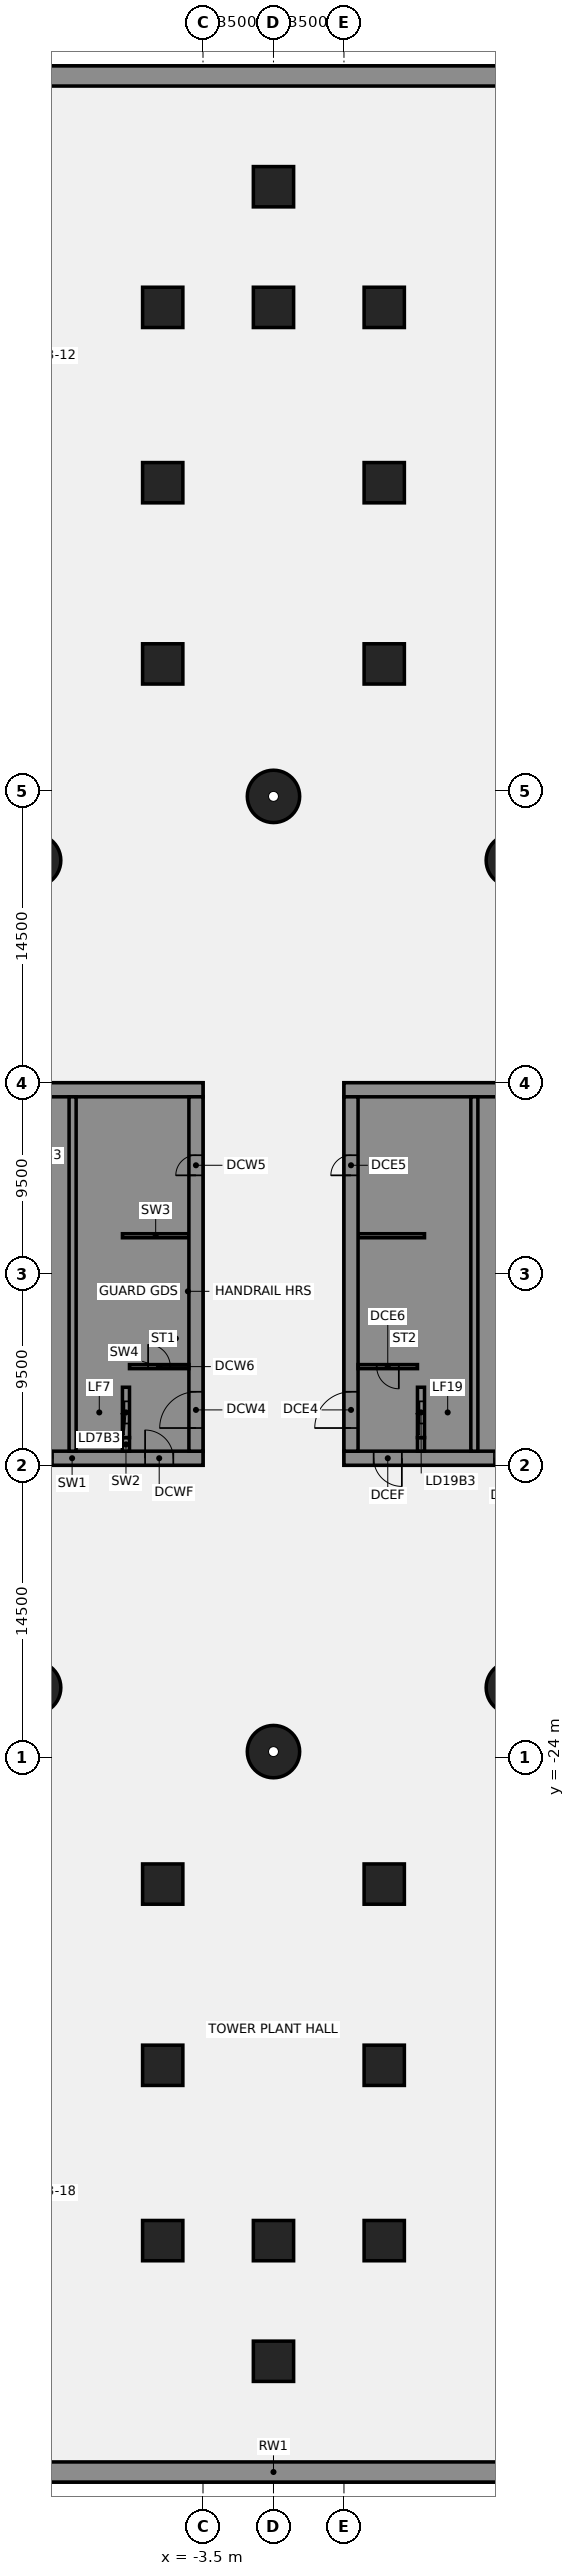
"""IFC4 building model, lengths in metres.
Left out: names, types, materials, properties, quantities, classifications, styles, units other than length and angle.
Written with IfcOpenShell. Run it as: python <this file> out.ifc"""

import sys

from ifc_helpers import new_model, si_unit, direction, frame, frame_2d, origin, origin_2d, place, context, subcontext, project, spatial, polyline, rectangle, circle, outline, extrude, element, fill, save


model = new_model("IFC4")
c1 = context("Model", 3, precision=1e-05, world=origin(), true_north=direction((0.0, 1.0)))
c2 = subcontext(c1, "Body", "Model", "MODEL_VIEW")
j1 = project(units=[si_unit("LENGTHUNIT", "METRE"), si_unit("PLANEANGLEUNIT", "RADIAN")], contexts=[c1])
p1 = place(None, origin())
s1 = spatial("IfcSite", under=j1, at=p1, CompositionType="ELEMENT")
p2 = place(p1, origin())
s2 = spatial("IfcBuilding", under=s1, at=p2, CompositionType="ELEMENT")
p3 = place(p2, frame((0.0, 0.0, -21.0)))
s3 = spatial("IfcBuildingStorey", under=s2, at=p3, CompositionType="ELEMENT", Elevation=-21.0)
for number, where, z_axis, x_axis in (
    (1, (63.931, -59.5, -0.3), (0.0, 0.0, 1.0), (-1.0, 0.0, 0.0)),
    (2, (-63.931, 59.5, -0.3), (0.0, 0.0, 1.0), (1.0, 0.0, 0.0)),
):
    element("IfcWall", number, at=place(p3, frame(where, z_axis=z_axis, x_axis=x_axis)), inside=s3, PredefinedType="SOLIDWALL", context=c2, shape_type="SweptSolid", body=[
        extrude(rectangle(XDim=127.863, YDim=1.0, at=frame_2d((63.931, 0.0))), origin(), (0.0, 0.0, 1.0), 6.85),
    ])
for number, where, z_axis, x_axis in (
    (3, (11.86, 20.543, -0.3), (0.0, 0.0, 1.0), (1.0, 0.0, 0.0)),
    (4, (0.0, 23.721, -0.3), (0.0, 0.0, 1.0), (1.0, 0.0, 0.0)),
    (5, (-11.86, 20.543, -0.3), (0.0, 0.0, 1.0), (1.0, 0.0, 0.0)),
    (6, (-11.86, -20.543, -0.3), (0.0, 0.0, 1.0), (1.0, 0.0, 0.0)),
    (7, (0.0, -23.721, -0.3), (0.0, 0.0, 1.0), (1.0, 0.0, 0.0)),
    (8, (11.86, -20.543, -0.3), (0.0, 0.0, 1.0), (1.0, 0.0, 0.0)),
):
    element("IfcColumn", number, at=place(p3, frame(where, z_axis=z_axis, x_axis=x_axis)), inside=s3, PredefinedType="COLUMN", context=c2, shape_type="SweptSolid", body=[
        extrude(circle(Radius=1.3, at=origin_2d()), origin(), (0.0, 0.0, 1.0), 6.85),
    ])
for number, where, z_axis, x_axis in (
    (9, (-5.5, 39.3, -0.3), (0.0, 0.0, 1.0), (1.0, 0.0, 0.0)),
    (10, (5.5, 39.3, -0.3), (0.0, 0.0, 1.0), (1.0, 0.0, 0.0)),
    (11, (-5.5, 30.3, -0.3), (0.0, 0.0, 1.0), (1.0, 0.0, 0.0)),
    (12, (5.5, 30.3, -0.3), (0.0, 0.0, 1.0), (1.0, 0.0, 0.0)),
    (13, (5.5, 48.008, -0.3), (0.0, 0.0, 1.0), (1.0, 0.0, 0.0)),
    (14, (0.0, 48.008, -0.3), (0.0, 0.0, 1.0), (1.0, 0.0, 0.0)),
    (15, (-5.5, 48.008, -0.3), (0.0, 0.0, 1.0), (1.0, 0.0, 0.0)),
    (16, (5.5, -39.3, -0.3), (0.0, 0.0, 1.0), (1.0, 0.0, 0.0)),
    (17, (-5.5, -39.3, -0.3), (0.0, 0.0, 1.0), (1.0, 0.0, 0.0)),
    (18, (5.5, -30.3, -0.3), (0.0, 0.0, 1.0), (1.0, 0.0, 0.0)),
    (19, (-5.5, -30.3, -0.3), (0.0, 0.0, 1.0), (1.0, 0.0, 0.0)),
    (20, (-5.5, -48.008, -0.3), (0.0, 0.0, 1.0), (1.0, 0.0, 0.0)),
    (21, (0.0, -48.008, -0.3), (0.0, 0.0, 1.0), (1.0, 0.0, 0.0)),
    (22, (5.5, -48.008, -0.3), (0.0, 0.0, 1.0), (1.0, 0.0, 0.0)),
    (23, (0.0, -54.0, -0.3), (0.0, 0.0, 1.0), (1.0, 0.0, 0.0)),
    (24, (0.0, 54.0, -0.3), (0.0, 0.0, 1.0), (1.0, 0.0, 0.0)),
):
    element("IfcColumn", number, at=place(p3, frame(where, z_axis=z_axis, x_axis=x_axis)), inside=s3, PredefinedType="COLUMN", context=c2, shape_type="SweptSolid", body=[
        extrude(rectangle(XDim=2.0, YDim=2.0, at=origin_2d()), origin(), (0.0, 0.0, 1.0), 6.85),
    ])
p4 = place(p3, frame((-16.5, -9.15, 0.0), z_axis=(0.0, 0.0, 1.0), x_axis=(1.0, 0.0, 0.0)))
e25 = element("IfcWall", 25, at=p4, inside=s3, PredefinedType="SHEAR", context=c2, shape_type="SweptSolid", body=[
    extrude(rectangle(XDim=13.0, YDim=0.7, at=frame_2d((6.5, 0.0))), origin(), (0.0, 0.0, 1.0), 6.55),
])
p5 = place(p4, frame((4.15, 0.0, 0.0)))
e26 = element("IfcOpeningElement", 26, at=p5, cuts=e25, PredefinedType="OPENING", context=c2, shape_type="SweptSolid", body=[
    extrude(rectangle(XDim=1.4, YDim=2.1, at=frame_2d((0.7, 1.05))), frame((0.0, 0.36, 0.0), z_axis=(0.0, -1.0, 0.0), x_axis=(1.0, 0.0, 0.0)), (0.0, 0.0, 1.0), 0.72),
])
p6 = place(p4, frame((10.125, 0.0, 0.0)))
e27 = element("IfcOpeningElement", 27, at=p6, cuts=e25, PredefinedType="OPENING", context=c2, shape_type="SweptSolid", body=[
    extrude(rectangle(XDim=1.4, YDim=2.1, at=frame_2d((0.7, 1.05))), frame((0.0, 0.36, 0.0), z_axis=(0.0, -1.0, 0.0), x_axis=(1.0, 0.0, 0.0)), (0.0, 0.0, 1.0), 0.72),
])
p7 = place(p3, frame((-16.5, 9.15, 0.0), z_axis=(0.0, 0.0, 1.0), x_axis=(1.0, 0.0, 0.0)))
e28 = element("IfcWall", 28, at=p7, inside=s3, PredefinedType="SHEAR", context=c2, shape_type="SweptSolid", body=[
    extrude(rectangle(XDim=13.0, YDim=0.7, at=frame_2d((6.5, 0.0))), origin(), (0.0, 0.0, 1.0), 6.55),
])
p8 = place(p3, origin())
e29 = element("IfcWall", 29, at=p8, inside=s3, PredefinedType="SHEAR", context=c2, shape_type="SweptSolid", body=[
    extrude(outline(polyline([(-9.8, -5.375), (-9.8, -5.625), (-7.5, -5.625), (-7.15, -5.625), (-7.15, 8.8), (-7.5, 8.8), (-9.8, 8.8), (-9.8, 8.125), (-7.5, 8.125), (-7.5, 5.625), (-9.8, 5.625), (-9.8, 5.375), (-7.5, 5.375), (-7.5, 2.875), (-9.8, 2.875), (-9.8, 2.625), (-7.5, 2.625), (-7.5, 0.125), (-9.8, 0.125), (-9.8, -0.125), (-7.5, -0.125), (-7.5, -2.625), (-9.8, -2.625), (-9.8, -2.875), (-7.5, -2.875), (-7.5, -5.375), (-9.8, -5.375)])), origin(), (0.0, 0.0, 1.0), 6.55),
])
p9 = place(p3, origin())
e30 = element("IfcWall", 30, at=p9, inside=s3, PredefinedType="SHEAR", context=c2, shape_type="SweptSolid", body=[
    extrude(outline(polyline([(-7.5, -8.125), (-9.55, -8.125), (-9.55, -5.625), (-9.8, -5.625), (-9.8, -8.125), (-9.8, -8.8), (-7.5, -8.8), (-7.5, -8.125)])), origin(), (0.0, 0.0, 1.0), 6.55),
])
p10 = place(p3, frame((-7.325, -8.8, 0.0), z_axis=(0.0, 0.0, 1.0), x_axis=(0.0, 1.0, 0.0)))
e31 = element("IfcWall", 31, at=p10, inside=s3, PredefinedType="SHEAR", context=c2, shape_type="SweptSolid", body=[
    extrude(rectangle(XDim=0.675, YDim=0.35, at=frame_2d((0.337, 0.0))), origin(), (0.0, 0.0, 1.0), 6.55),
])
p11 = place(p3, frame((-7.5, 1.9, 0.0), z_axis=(0.0, 0.0, 1.0), x_axis=(1.0, 0.0, 0.0)))
e32 = element("IfcWall", 32, at=p11, inside=s3, PredefinedType="SHEAR", context=c2, shape_type="SweptSolid", body=[
    extrude(rectangle(XDim=3.3, YDim=0.2, at=frame_2d((1.65, 0.0))), origin(), (0.0, 0.0, 1.0), 6.55),
])
p12 = place(p3, frame((-9.975, -8.8, 0.0), z_axis=(0.0, 0.0, 1.0), x_axis=(0.0, 1.0, 0.0)))
e33 = element("IfcWall", 33, at=p12, inside=s3, PredefinedType="SHEAR", context=c2, shape_type="SweptSolid", body=[
    extrude(rectangle(XDim=17.6, YDim=0.35, at=frame_2d((8.8, 0.0))), origin(), (0.0, 0.0, 1.0), 6.55),
])
p13 = place(p3, frame((-7.325, -8.125, 0.0), z_axis=(0.0, 0.0, 1.0), x_axis=(0.0, 1.0, 0.0)))
e34 = element("IfcWall", 34, at=p13, inside=s3, PredefinedType="SHEAR", context=c2, shape_type="SweptSolid", body=[
    extrude(rectangle(XDim=2.5, YDim=0.35, at=frame_2d((1.25, 0.0))), origin(), (0.0, 0.0, 1.0), 6.55),
])
p14 = place(p13, frame((0.7, 0.0, 0.0)))
e35 = element("IfcOpeningElement", 35, at=p14, cuts=e34, PredefinedType="OPENING", context=c2, shape_type="SweptSolid", body=[
    extrude(rectangle(XDim=1.1, YDim=2.1, at=frame_2d((0.55, 1.05))), frame((0.0, 0.185, 0.0), z_axis=(0.0, -1.0, 0.0), x_axis=(1.0, 0.0, 0.0)), (0.0, 0.0, 1.0), 0.37),
])
p15 = place(p3, frame((-3.85, -8.8, 0.0), z_axis=(0.0, 0.0, 1.0), x_axis=(0.0, 1.0, 0.0)))
e36 = element("IfcWall", 36, at=p15, inside=s3, PredefinedType="SHEAR", context=c2, shape_type="SweptSolid", body=[
    extrude(rectangle(XDim=17.6, YDim=0.7, at=frame_2d((8.8, 0.0))), origin(), (0.0, 0.0, 1.0), 6.55),
])
p16 = place(p15, frame((1.15, 0.0, 0.0)))
e37 = element("IfcOpeningElement", 37, at=p16, cuts=e36, PredefinedType="OPENING", context=c2, shape_type="SweptSolid", body=[
    extrude(rectangle(XDim=1.8, YDim=2.1, at=frame_2d((0.9, 1.05))), frame((0.0, 0.36, 0.0), z_axis=(0.0, -1.0, 0.0), x_axis=(1.0, 0.0, 0.0)), (0.0, 0.0, 1.0), 0.72),
])
p17 = place(p15, frame((13.7, 0.0, 0.0)))
e38 = element("IfcOpeningElement", 38, at=p17, cuts=e36, PredefinedType="OPENING", context=c2, shape_type="SweptSolid", body=[
    extrude(rectangle(XDim=1.0, YDim=2.1, at=frame_2d((0.5, 1.05))), frame((0.0, 0.36, 0.0), z_axis=(0.0, -1.0, 0.0), x_axis=(1.0, 0.0, 0.0)), (0.0, 0.0, 1.0), 0.72),
])
p18 = place(p3, frame((-7.15, -4.6, 0.0), z_axis=(0.0, 0.0, 1.0), x_axis=(1.0, 0.0, 0.0)))
e39 = element("IfcWall", 39, at=p18, inside=s3, PredefinedType="SHEAR", context=c2, shape_type="SweptSolid", body=[
    extrude(rectangle(XDim=2.95, YDim=0.2, at=frame_2d((1.475, 0.0))), origin(), (0.0, 0.0, 1.0), 6.55),
])
p19 = place(p18, frame((0.925, 0.0, 0.0)))
e40 = element("IfcOpeningElement", 40, at=p19, cuts=e39, PredefinedType="OPENING", context=c2, shape_type="SweptSolid", body=[
    extrude(rectangle(XDim=1.1, YDim=2.1, at=frame_2d((0.55, 1.05))), frame((0.0, 0.11, 0.0), z_axis=(0.0, -1.0, 0.0), x_axis=(1.0, 0.0, 0.0)), (0.0, 0.0, 1.0), 0.22),
])
p20 = place(p3, frame((16.5, -9.15, 0.0), z_axis=(0.0, 0.0, 1.0), x_axis=(-1.0, 0.0, 0.0)))
e41 = element("IfcWall", 41, at=p20, inside=s3, PredefinedType="SHEAR", context=c2, shape_type="SweptSolid", body=[
    extrude(rectangle(XDim=13.0, YDim=0.7, at=frame_2d((6.5, 0.0))), origin(), (0.0, 0.0, 1.0), 6.55),
])
p21 = place(p20, frame((4.15, 0.0, 0.0)))
e42 = element("IfcOpeningElement", 42, at=p21, cuts=e41, PredefinedType="OPENING", context=c2, shape_type="SweptSolid", body=[
    extrude(rectangle(XDim=1.4, YDim=2.1, at=frame_2d((0.7, 1.05))), frame((0.0, 0.36, 0.0), z_axis=(0.0, -1.0, 0.0), x_axis=(1.0, 0.0, 0.0)), (0.0, 0.0, 1.0), 0.72),
])
p22 = place(p20, frame((10.125, 0.0, 0.0)))
e43 = element("IfcOpeningElement", 43, at=p22, cuts=e41, PredefinedType="OPENING", context=c2, shape_type="SweptSolid", body=[
    extrude(rectangle(XDim=1.4, YDim=2.1, at=frame_2d((0.7, 1.05))), frame((0.0, 0.36, 0.0), z_axis=(0.0, -1.0, 0.0), x_axis=(1.0, 0.0, 0.0)), (0.0, 0.0, 1.0), 0.72),
])
p23 = place(p3, frame((16.5, 9.15, 0.0), z_axis=(0.0, 0.0, 1.0), x_axis=(-1.0, 0.0, 0.0)))
e44 = element("IfcWall", 44, at=p23, inside=s3, PredefinedType="SHEAR", context=c2, shape_type="SweptSolid", body=[
    extrude(rectangle(XDim=13.0, YDim=0.7, at=frame_2d((6.5, 0.0))), origin(), (0.0, 0.0, 1.0), 6.55),
])
p24 = place(p3, origin())
e45 = element("IfcWall", 45, at=p24, inside=s3, PredefinedType="SHEAR", context=c2, shape_type="SweptSolid", body=[
    extrude(outline(polyline([(9.8, -5.375), (7.5, -5.375), (7.5, -2.875), (9.8, -2.875), (9.8, -2.625), (7.5, -2.625), (7.5, -0.125), (9.8, -0.125), (9.8, 0.125), (7.5, 0.125), (7.5, 2.625), (9.8, 2.625), (9.8, 2.875), (7.5, 2.875), (7.5, 5.375), (9.8, 5.375), (9.8, 5.625), (7.5, 5.625), (7.5, 8.125), (9.8, 8.125), (9.8, 8.8), (7.5, 8.8), (7.15, 8.8), (7.15, -5.625), (7.5, -5.625), (9.8, -5.625), (9.8, -5.375)])), origin(), (0.0, 0.0, 1.0), 6.55),
])
p25 = place(p3, origin())
e46 = element("IfcWall", 46, at=p25, inside=s3, PredefinedType="SHEAR", context=c2, shape_type="SweptSolid", body=[
    extrude(outline(polyline([(7.5, -8.125), (7.5, -8.8), (9.8, -8.8), (9.8, -8.125), (9.8, -5.625), (9.55, -5.625), (9.55, -8.125), (7.5, -8.125)])), origin(), (0.0, 0.0, 1.0), 6.55),
])
p26 = place(p3, frame((7.325, -8.8, 0.0), z_axis=(0.0, 0.0, 1.0), x_axis=(0.0, 1.0, 0.0)))
e47 = element("IfcWall", 47, at=p26, inside=s3, PredefinedType="SHEAR", context=c2, shape_type="SweptSolid", body=[
    extrude(rectangle(XDim=0.675, YDim=0.35, at=frame_2d((0.337, 0.0))), origin(), (0.0, 0.0, 1.0), 6.55),
])
p27 = place(p3, frame((7.5, 1.9, 0.0), z_axis=(0.0, 0.0, 1.0), x_axis=(-1.0, 0.0, 0.0)))
e48 = element("IfcWall", 48, at=p27, inside=s3, PredefinedType="SHEAR", context=c2, shape_type="SweptSolid", body=[
    extrude(rectangle(XDim=3.3, YDim=0.2, at=frame_2d((1.65, 0.0))), origin(), (0.0, 0.0, 1.0), 6.55),
])
p28 = place(p3, frame((9.975, -8.8, 0.0), z_axis=(0.0, 0.0, 1.0), x_axis=(0.0, 1.0, 0.0)))
e49 = element("IfcWall", 49, at=p28, inside=s3, PredefinedType="SHEAR", context=c2, shape_type="SweptSolid", body=[
    extrude(rectangle(XDim=17.6, YDim=0.35, at=frame_2d((8.8, 0.0))), origin(), (0.0, 0.0, 1.0), 6.55),
])
p29 = place(p3, frame((7.325, -8.125, 0.0), z_axis=(0.0, 0.0, 1.0), x_axis=(0.0, 1.0, 0.0)))
e50 = element("IfcWall", 50, at=p29, inside=s3, PredefinedType="SHEAR", context=c2, shape_type="SweptSolid", body=[
    extrude(rectangle(XDim=2.5, YDim=0.35, at=frame_2d((1.25, 0.0))), origin(), (0.0, 0.0, 1.0), 6.55),
])
p30 = place(p29, frame((0.7, 0.0, 0.0)))
e51 = element("IfcOpeningElement", 51, at=p30, cuts=e50, PredefinedType="OPENING", context=c2, shape_type="SweptSolid", body=[
    extrude(rectangle(XDim=1.1, YDim=2.1, at=frame_2d((0.55, 1.05))), frame((0.0, 0.185, 0.0), z_axis=(0.0, -1.0, 0.0), x_axis=(1.0, 0.0, 0.0)), (0.0, 0.0, 1.0), 0.37),
])
p31 = place(p3, frame((3.85, -8.8, 0.0), z_axis=(0.0, 0.0, 1.0), x_axis=(0.0, 1.0, 0.0)))
e52 = element("IfcWall", 52, at=p31, inside=s3, PredefinedType="SHEAR", context=c2, shape_type="SweptSolid", body=[
    extrude(rectangle(XDim=17.6, YDim=0.7, at=frame_2d((8.8, 0.0))), origin(), (0.0, 0.0, 1.0), 6.55),
])
p32 = place(p31, frame((1.15, 0.0, 0.0)))
e53 = element("IfcOpeningElement", 53, at=p32, cuts=e52, PredefinedType="OPENING", context=c2, shape_type="SweptSolid", body=[
    extrude(rectangle(XDim=1.8, YDim=2.1, at=frame_2d((0.9, 1.05))), frame((0.0, 0.36, 0.0), z_axis=(0.0, -1.0, 0.0), x_axis=(1.0, 0.0, 0.0)), (0.0, 0.0, 1.0), 0.72),
])
p33 = place(p31, frame((13.7, 0.0, 0.0)))
e54 = element("IfcOpeningElement", 54, at=p33, cuts=e52, PredefinedType="OPENING", context=c2, shape_type="SweptSolid", body=[
    extrude(rectangle(XDim=1.0, YDim=2.1, at=frame_2d((0.5, 1.05))), frame((0.0, 0.36, 0.0), z_axis=(0.0, -1.0, 0.0), x_axis=(1.0, 0.0, 0.0)), (0.0, 0.0, 1.0), 0.72),
])
p34 = place(p3, frame((7.15, -4.6, 0.0), z_axis=(0.0, 0.0, 1.0), x_axis=(-1.0, 0.0, 0.0)))
e55 = element("IfcWall", 55, at=p34, inside=s3, PredefinedType="SHEAR", context=c2, shape_type="SweptSolid", body=[
    extrude(rectangle(XDim=2.95, YDim=0.2, at=frame_2d((1.475, 0.0))), origin(), (0.0, 0.0, 1.0), 6.55),
])
p35 = place(p34, frame((0.925, 0.0, 0.0)))
e56 = element("IfcOpeningElement", 56, at=p35, cuts=e55, PredefinedType="OPENING", context=c2, shape_type="SweptSolid", body=[
    extrude(rectangle(XDim=1.1, YDim=2.1, at=frame_2d((0.55, 1.05))), frame((0.0, 0.11, 0.0), z_axis=(0.0, -1.0, 0.0), x_axis=(1.0, 0.0, 0.0)), (0.0, 0.0, 1.0), 0.22),
])
p36 = place(p5, origin())
e57 = element("IfcDoor", 57, at=p36, inside=s3, OperationType="SINGLE_SWING_LEFT", PredefinedType="DOOR", context=c2, shape_type="SweptSolid", body=[
    extrude(rectangle(XDim=1.4, YDim=2.1, at=frame_2d((0.7, 1.05))), frame((0.0, 0.025, 0.0), z_axis=(0.0, -1.0, 0.0), x_axis=(1.0, 0.0, 0.0)), (0.0, 0.0, 1.0), 0.05),
])
fill(e26, e57)
p37 = place(p6, origin())
e58 = element("IfcDoor", 58, at=p37, inside=s3, OperationType="SINGLE_SWING_LEFT", PredefinedType="DOOR", context=c2, shape_type="SweptSolid", body=[
    extrude(rectangle(XDim=1.4, YDim=2.1, at=frame_2d((0.7, 1.05))), frame((0.0, 0.025, 0.0), z_axis=(0.0, -1.0, 0.0), x_axis=(1.0, 0.0, 0.0)), (0.0, 0.0, 1.0), 0.05),
])
fill(e27, e58)
p38 = place(p16, origin())
e59 = element("IfcDoor", 59, at=p38, inside=s3, OperationType="SINGLE_SWING_LEFT", PredefinedType="DOOR", context=c2, shape_type="SweptSolid", body=[
    extrude(rectangle(XDim=1.8, YDim=2.1, at=frame_2d((0.9, 1.05))), frame((0.0, 0.025, 0.0), z_axis=(0.0, -1.0, 0.0), x_axis=(1.0, 0.0, 0.0)), (0.0, 0.0, 1.0), 0.05),
])
fill(e37, e59)
p39 = place(p17, origin())
e60 = element("IfcDoor", 60, at=p39, inside=s3, OperationType="SINGLE_SWING_LEFT", PredefinedType="DOOR", context=c2, shape_type="SweptSolid", body=[
    extrude(rectangle(XDim=1.0, YDim=2.1, at=frame_2d((0.5, 1.05))), frame((0.0, 0.025, 0.0), z_axis=(0.0, -1.0, 0.0), x_axis=(1.0, 0.0, 0.0)), (0.0, 0.0, 1.0), 0.05),
])
fill(e38, e60)
p40 = place(p19, origin())
e61 = element("IfcDoor", 61, at=p40, inside=s3, OperationType="SINGLE_SWING_LEFT", PredefinedType="DOOR", context=c2, shape_type="SweptSolid", body=[
    extrude(rectangle(XDim=1.1, YDim=2.1, at=frame_2d((0.55, 1.05))), frame((0.0, 0.025, 0.0), z_axis=(0.0, -1.0, 0.0), x_axis=(1.0, 0.0, 0.0)), (0.0, 0.0, 1.0), 0.05),
])
fill(e40, e61)
p41 = place(p14, origin())
e62 = element("IfcDoor", 62, at=p41, inside=s3, OperationType="SLIDING_TO_LEFT", PredefinedType="DOOR", context=c2, shape_type="SweptSolid", body=[
    extrude(rectangle(XDim=1.1, YDim=2.1, at=frame_2d((0.55, 1.05))), frame((0.0, 0.025, 0.0), z_axis=(0.0, -1.0, 0.0), x_axis=(1.0, 0.0, 0.0)), (0.0, 0.0, 1.0), 0.05),
])
fill(e35, e62)
p42 = place(p21, origin())
e63 = element("IfcDoor", 63, at=p42, inside=s3, OperationType="SINGLE_SWING_LEFT", PredefinedType="DOOR", context=c2, shape_type="SweptSolid", body=[
    extrude(rectangle(XDim=1.4, YDim=2.1, at=frame_2d((0.7, 1.05))), frame((0.0, 0.025, 0.0), z_axis=(0.0, -1.0, 0.0), x_axis=(1.0, 0.0, 0.0)), (0.0, 0.0, 1.0), 0.05),
])
fill(e42, e63)
p43 = place(p22, origin())
e64 = element("IfcDoor", 64, at=p43, inside=s3, OperationType="SINGLE_SWING_LEFT", PredefinedType="DOOR", context=c2, shape_type="SweptSolid", body=[
    extrude(rectangle(XDim=1.4, YDim=2.1, at=frame_2d((0.7, 1.05))), frame((0.0, 0.025, 0.0), z_axis=(0.0, -1.0, 0.0), x_axis=(1.0, 0.0, 0.0)), (0.0, 0.0, 1.0), 0.05),
])
fill(e43, e64)
p44 = place(p32, origin())
e65 = element("IfcDoor", 65, at=p44, inside=s3, OperationType="SINGLE_SWING_LEFT", PredefinedType="DOOR", context=c2, shape_type="SweptSolid", body=[
    extrude(rectangle(XDim=1.8, YDim=2.1, at=frame_2d((0.9, 1.05))), frame((0.0, 0.025, 0.0), z_axis=(0.0, -1.0, 0.0), x_axis=(1.0, 0.0, 0.0)), (0.0, 0.0, 1.0), 0.05),
])
fill(e53, e65)
p45 = place(p33, origin())
e66 = element("IfcDoor", 66, at=p45, inside=s3, OperationType="SINGLE_SWING_LEFT", PredefinedType="DOOR", context=c2, shape_type="SweptSolid", body=[
    extrude(rectangle(XDim=1.0, YDim=2.1, at=frame_2d((0.5, 1.05))), frame((0.0, 0.025, 0.0), z_axis=(0.0, -1.0, 0.0), x_axis=(1.0, 0.0, 0.0)), (0.0, 0.0, 1.0), 0.05),
])
fill(e54, e66)
p46 = place(p35, origin())
e67 = element("IfcDoor", 67, at=p46, inside=s3, OperationType="SINGLE_SWING_LEFT", PredefinedType="DOOR", context=c2, shape_type="SweptSolid", body=[
    extrude(rectangle(XDim=1.1, YDim=2.1, at=frame_2d((0.55, 1.05))), frame((0.0, 0.025, 0.0), z_axis=(0.0, -1.0, 0.0), x_axis=(1.0, 0.0, 0.0)), (0.0, 0.0, 1.0), 0.05),
])
fill(e56, e67)
p47 = place(p30, origin())
e68 = element("IfcDoor", 68, at=p47, inside=s3, OperationType="SLIDING_TO_LEFT", PredefinedType="DOOR", context=c2, shape_type="SweptSolid", body=[
    extrude(rectangle(XDim=1.1, YDim=2.1, at=frame_2d((0.55, 1.05))), frame((0.0, 0.025, 0.0), z_axis=(0.0, -1.0, 0.0), x_axis=(1.0, 0.0, 0.0)), (0.0, 0.0, 1.0), 0.05),
])
fill(e51, e68)
save(model, sys.argv[1])
